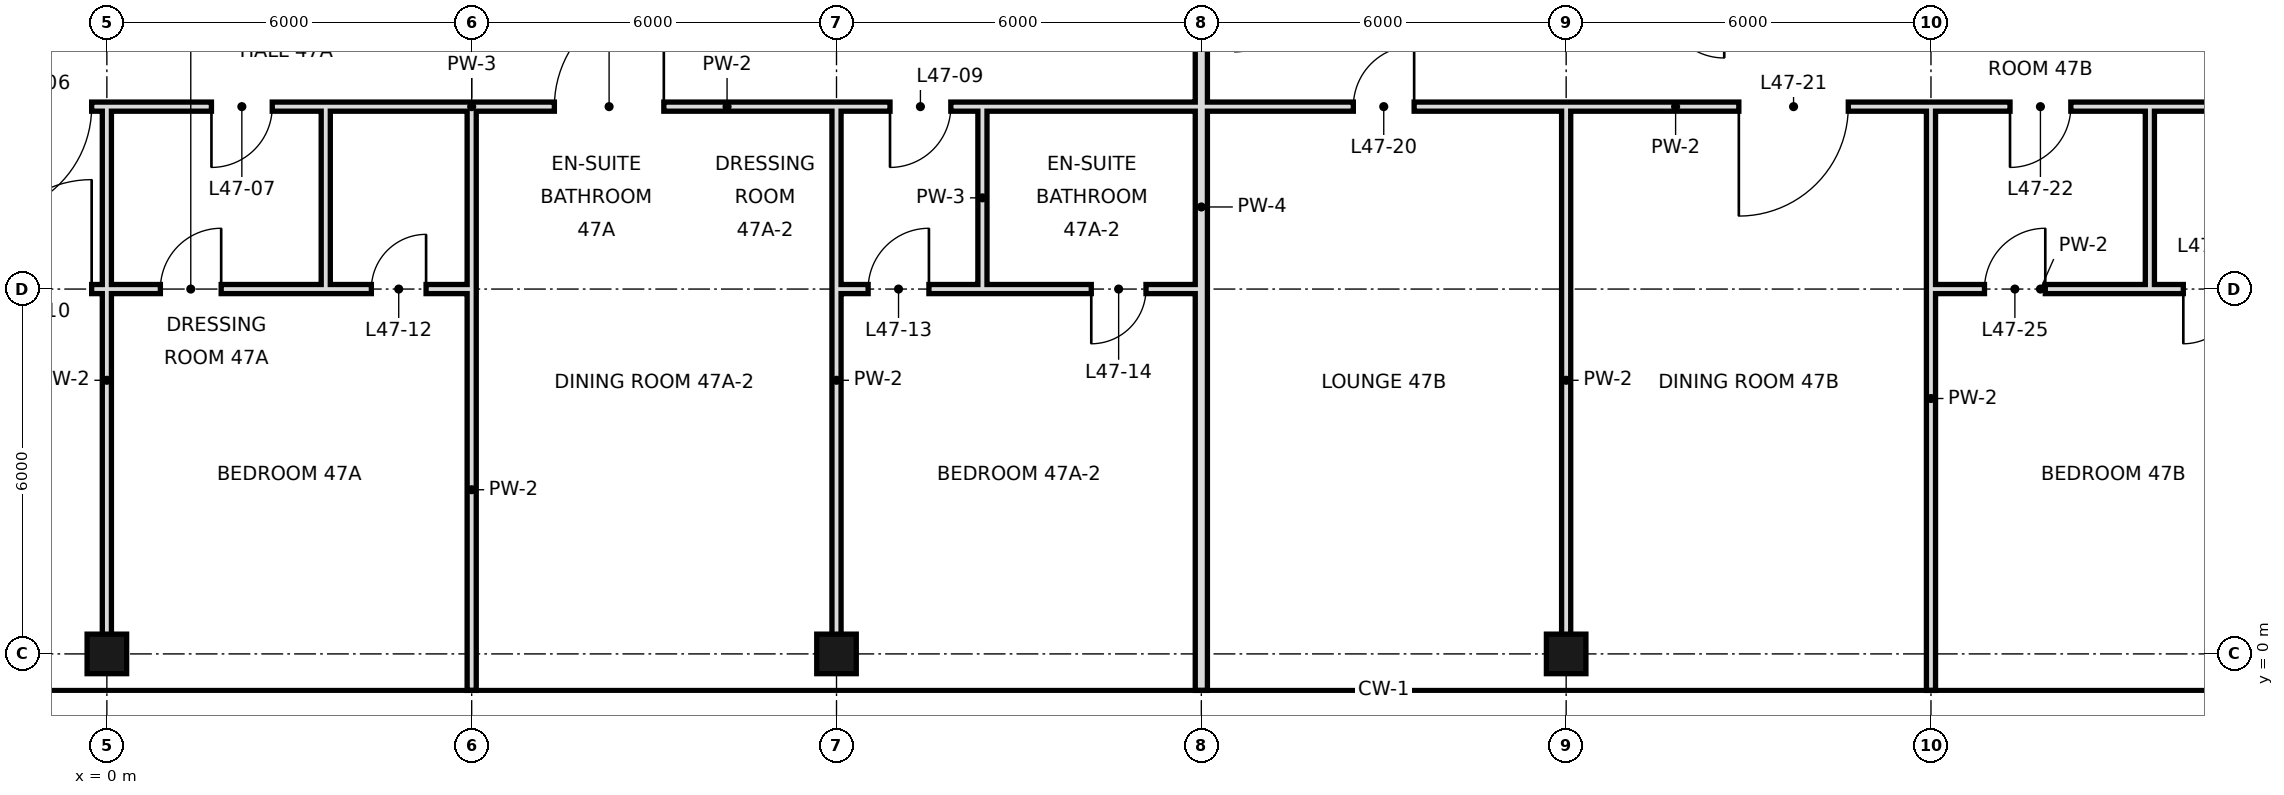
"""IFC4 building model, lengths in metres.
Left out: names, types, materials, properties, quantities, classifications, styles, units other than length and angle.
Written with IfcOpenShell. Run it as: python <this file> out.ifc"""

import sys

from ifc_helpers import new_model, si_unit, direction, frame, frame_2d, origin, origin_2d, place, context, subcontext, project, spatial, rectangle, hollow_rectangle, extrude, element, fill, save


model = new_model("IFC4")
c1 = context("Model", 3, precision=1e-05, world=origin(), true_north=direction((0.0, 1.0)))
c2 = subcontext(c1, "Body", "Model", "MODEL_VIEW")
j1 = project(units=[si_unit("LENGTHUNIT", "METRE"), si_unit("PLANEANGLEUNIT", "RADIAN")], contexts=[c1])
p1 = place(None, origin())
s1 = spatial("IfcSite", under=j1, at=p1, CompositionType="ELEMENT")
p2 = place(p1, origin())
s2 = spatial("IfcBuilding", under=s1, at=p2, CompositionType="ELEMENT")
p3 = place(p2, frame((0.0, 0.0, 202.8)))
s3 = spatial("IfcBuildingStorey", under=s2, at=p3, CompositionType="ELEMENT", Elevation=202.8)
for number, where, z_axis, x_axis in (
    (1, (0.0, 0.0, 0.0), (0.0, 0.0, 1.0), (1.0, 0.0, 0.0)),
    (2, (12.0, 0.0, 0.0), (0.0, 0.0, 1.0), (1.0, 0.0, 0.0)),
    (3, (24.0, 0.0, 0.0), (0.0, 0.0, 1.0), (1.0, 0.0, 0.0)),
):
    element("IfcColumn", number, at=place(p3, frame(where, z_axis=z_axis, x_axis=x_axis)), inside=s3, PredefinedType="COLUMN", context=c2, shape_type="SweptSolid", body=[
        extrude(hollow_rectangle(XDim=0.65, YDim=0.65, WallThickness=0.032, at=origin_2d()), origin(), (0.0, 0.0, 1.0), 3.6),
    ])
for number, where, z_axis, x_axis in (
    (4, (0.0, 0.0, 0.0), (0.0, 0.0, 1.0), (0.0, 1.0, 0.0)),
    (5, (12.0, 0.0, 0.0), (0.0, 0.0, 1.0), (0.0, 1.0, 0.0)),
):
    element("IfcWall", number, at=place(p3, frame(where, z_axis=z_axis, x_axis=x_axis)), inside=s3, PredefinedType="PARTITIONING", context=c2, shape_type="SweptSolid", body=[
        extrude(rectangle(XDim=9.0, YDim=0.15, at=frame_2d((4.5, 0.0))), origin(), (0.0, 0.0, 1.0), 2.72),
    ])
p4 = place(p3, frame((14.4, 6.0, 0.0), z_axis=(0.0, 0.0, 1.0), x_axis=(0.0, 1.0, 0.0)))
e6 = element("IfcWall", 6, at=p4, inside=s3, PredefinedType="PARTITIONING", context=c2, shape_type="SweptSolid", body=[
    extrude(rectangle(XDim=3.0, YDim=0.15, at=frame_2d((1.5, 0.0))), origin(), (0.0, 0.0, 1.0), 3.42),
])
p5 = place(p3, frame((18.0, -0.6, 0.0), z_axis=(0.0, 0.0, 1.0), x_axis=(0.0, 1.0, 0.0)))
e7 = element("IfcWall", 7, at=p5, inside=s3, PredefinedType="SOLIDWALL", context=c2, shape_type="SweptSolid", body=[
    extrude(rectangle(XDim=15.9, YDim=0.2, at=frame_2d((7.95, 0.0))), origin(), (0.0, 0.0, 1.0), 2.72),
])
p6 = place(p3, frame((24.0, 0.0, 0.0), z_axis=(0.0, 0.0, 1.0), x_axis=(0.0, 1.0, 0.0)))
e8 = element("IfcWall", 8, at=p6, inside=s3, PredefinedType="PARTITIONING", context=c2, shape_type="SweptSolid", body=[
    extrude(rectangle(XDim=9.0, YDim=0.15, at=frame_2d((4.5, 0.0))), origin(), (0.0, 0.0, 1.0), 2.72),
])
p7 = place(p3, frame((3.6, 6.0, 0.0), z_axis=(0.0, 0.0, 1.0), x_axis=(0.0, 1.0, 0.0)))
e9 = element("IfcWall", 9, at=p7, inside=s3, PredefinedType="PARTITIONING", context=c2, shape_type="SweptSolid", body=[
    extrude(rectangle(XDim=3.0, YDim=0.15, at=frame_2d((1.5, 0.0))), origin(), (0.0, 0.0, 1.0), 3.42),
])
p8 = place(p3, frame((30.0, -0.6, 0.0), z_axis=(0.0, 0.0, 1.0), x_axis=(0.0, 1.0, 0.0)))
e10 = element("IfcWall", 10, at=p8, inside=s3, PredefinedType="PARTITIONING", context=c2, shape_type="SweptSolid", body=[
    extrude(rectangle(XDim=9.6, YDim=0.15, at=frame_2d((4.8, 0.0))), origin(), (0.0, 0.0, 1.0), 2.72),
])
p9 = place(p3, frame((33.6, 6.0, 0.0), z_axis=(0.0, 0.0, 1.0), x_axis=(0.0, 1.0, 0.0)))
e11 = element("IfcWall", 11, at=p9, inside=s3, PredefinedType="PARTITIONING", context=c2, shape_type="SweptSolid", body=[
    extrude(rectangle(XDim=3.0, YDim=0.15, at=frame_2d((1.5, 0.0))), origin(), (0.0, 0.0, 1.0), 3.42),
])
p10 = place(p3, frame((6.0, -0.6, 0.0), z_axis=(0.0, 0.0, 1.0), x_axis=(0.0, 1.0, 0.0)))
e12 = element("IfcWall", 12, at=p10, inside=s3, PredefinedType="PARTITIONING", context=c2, shape_type="SweptSolid", body=[
    extrude(rectangle(XDim=6.6, YDim=0.15, at=frame_2d((3.3, 0.0))), origin(), (0.0, 0.0, 1.0), 2.72),
])
p11 = place(p3, frame((6.0, 6.0, 0.0), z_axis=(0.0, 0.0, 1.0), x_axis=(0.0, 1.0, 0.0)))
e13 = element("IfcWall", 13, at=p11, inside=s3, PredefinedType="PARTITIONING", context=c2, shape_type="SweptSolid", body=[
    extrude(rectangle(XDim=3.0, YDim=0.15, at=frame_2d((1.5, 0.0))), origin(), (0.0, 0.0, 1.0), 2.72),
])
p12 = place(p3, frame((-12.0, 6.0, 0.0), z_axis=(0.0, 0.0, 1.0), x_axis=(1.0, 0.0, 0.0)))
e14 = element("IfcWall", 14, at=p12, inside=s3, PredefinedType="PARTITIONING", context=c2, shape_type="SweptSolid", body=[
    extrude(rectangle(XDim=15.6, YDim=0.15, at=frame_2d((7.8, 0.0))), origin(), (0.0, 0.0, 1.0), 2.72),
])
p13 = place(p12, frame((9.95, 0.0, 0.0)))
e15 = element("IfcOpeningElement", 15, at=p13, cuts=e14, PredefinedType="OPENING", context=c2, shape_type="SweptSolid", body=[
    extrude(rectangle(XDim=1.8, YDim=2.4, at=frame_2d((0.9, 1.2))), frame((0.0, 0.085, 0.0), z_axis=(0.0, -1.0, 0.0), x_axis=(1.0, 0.0, 0.0)), (0.0, 0.0, 1.0), 0.17),
])
p14 = place(p12, frame((12.88, 0.0, 0.0)))
e16 = element("IfcOpeningElement", 16, at=p14, cuts=e14, PredefinedType="OPENING", context=c2, shape_type="SweptSolid", body=[
    extrude(rectangle(XDim=1.0, YDim=2.4, at=frame_2d((0.5, 1.2))), frame((0.0, 0.085, 0.0), z_axis=(0.0, -1.0, 0.0), x_axis=(1.0, 0.0, 0.0)), (0.0, 0.0, 1.0), 0.17),
])
p15 = place(p3, frame((12.0, 6.0, 0.0), z_axis=(0.0, 0.0, 1.0), x_axis=(1.0, 0.0, 0.0)))
e17 = element("IfcWall", 17, at=p15, inside=s3, PredefinedType="PARTITIONING", context=c2, shape_type="SweptSolid", body=[
    extrude(rectangle(XDim=2.4, YDim=0.15, at=frame_2d((1.2, 0.0))), origin(), (0.0, 0.0, 1.0), 2.97),
])
p16 = place(p15, frame((0.52, 0.0, 0.0)))
e18 = element("IfcOpeningElement", 18, at=p16, cuts=e17, PredefinedType="OPENING", context=c2, shape_type="SweptSolid", body=[
    extrude(rectangle(XDim=1.0, YDim=2.4, at=frame_2d((0.5, 1.2))), frame((0.0, 0.085, 0.0), z_axis=(0.0, -1.0, 0.0), x_axis=(1.0, 0.0, 0.0)), (0.0, 0.0, 1.0), 0.17),
])
p17 = place(p3, frame((30.0, 6.0, 0.0), z_axis=(0.0, 0.0, 1.0), x_axis=(1.0, 0.0, 0.0)))
e19 = element("IfcWall", 19, at=p17, inside=s3, PredefinedType="PARTITIONING", context=c2, shape_type="SweptSolid", body=[
    extrude(rectangle(XDim=3.6, YDim=0.15, at=frame_2d((1.8, 0.0))), origin(), (0.0, 0.0, 1.0), 2.97),
])
p18 = place(p17, frame((0.88, 0.0, 0.0)))
e20 = element("IfcOpeningElement", 20, at=p18, cuts=e19, PredefinedType="OPENING", context=c2, shape_type="SweptSolid", body=[
    extrude(rectangle(XDim=1.0, YDim=2.4, at=frame_2d((0.5, 1.2))), frame((0.0, 0.085, 0.0), z_axis=(0.0, -1.0, 0.0), x_axis=(1.0, 0.0, 0.0)), (0.0, 0.0, 1.0), 0.17),
])
p19 = place(p3, frame((3.6, 6.0, 0.0), z_axis=(0.0, 0.0, 1.0), x_axis=(1.0, 0.0, 0.0)))
e21 = element("IfcWall", 21, at=p19, inside=s3, PredefinedType="PARTITIONING", context=c2, shape_type="SweptSolid", body=[
    extrude(rectangle(XDim=2.4, YDim=0.15, at=frame_2d((1.2, 0.0))), origin(), (0.0, 0.0, 1.0), 2.97),
])
p20 = place(p19, frame((0.75, 0.0, 0.0)))
e22 = element("IfcOpeningElement", 22, at=p20, cuts=e21, PredefinedType="OPENING", context=c2, shape_type="SweptSolid", body=[
    extrude(rectangle(XDim=0.9, YDim=2.4, at=frame_2d((0.45, 1.2))), frame((0.0, 0.085, 0.0), z_axis=(0.0, -1.0, 0.0), x_axis=(1.0, 0.0, 0.0)), (0.0, 0.0, 1.0), 0.17),
])
p21 = place(p3, frame((14.4, 6.0, 0.0), z_axis=(0.0, 0.0, 1.0), x_axis=(1.0, 0.0, 0.0)))
e23 = element("IfcWall", 23, at=p21, inside=s3, PredefinedType="PARTITIONING", context=c2, shape_type="SweptSolid", body=[
    extrude(rectangle(XDim=3.6, YDim=0.15, at=frame_2d((1.8, 0.0))), origin(), (0.0, 0.0, 1.0), 2.97),
])
p22 = place(p21, frame((1.79, 0.0, 0.0)))
e24 = element("IfcOpeningElement", 24, at=p22, cuts=e23, PredefinedType="OPENING", context=c2, shape_type="SweptSolid", body=[
    extrude(rectangle(XDim=0.9, YDim=2.4, at=frame_2d((0.45, 1.2))), frame((0.0, 0.085, 0.0), z_axis=(0.0, -1.0, 0.0), x_axis=(1.0, 0.0, 0.0)), (0.0, 0.0, 1.0), 0.17),
])
p23 = place(p3, frame((33.6, 6.0, 0.0), z_axis=(0.0, 0.0, 1.0), x_axis=(1.0, 0.0, 0.0)))
e25 = element("IfcWall", 25, at=p23, inside=s3, PredefinedType="PARTITIONING", context=c2, shape_type="SweptSolid", body=[
    extrude(rectangle(XDim=6.0, YDim=0.15, at=frame_2d((3.0, 0.0))), origin(), (0.0, 0.0, 1.0), 2.97),
])
p24 = place(p23, frame((0.55, 0.0, 0.0)))
e26 = element("IfcOpeningElement", 26, at=p24, cuts=e25, PredefinedType="OPENING", context=c2, shape_type="SweptSolid", body=[
    extrude(rectangle(XDim=0.9, YDim=2.4, at=frame_2d((0.45, 1.2))), frame((0.0, 0.085, 0.0), z_axis=(0.0, -1.0, 0.0), x_axis=(1.0, 0.0, 0.0)), (0.0, 0.0, 1.0), 0.17),
])
p25 = place(p23, frame((3.31, 0.0, 0.0)))
e27 = element("IfcOpeningElement", 27, at=p25, cuts=e25, PredefinedType="OPENING", context=c2, shape_type="SweptSolid", body=[
    extrude(rectangle(XDim=0.9, YDim=2.4, at=frame_2d((0.45, 1.2))), frame((0.0, 0.085, 0.0), z_axis=(0.0, -1.0, 0.0), x_axis=(1.0, 0.0, 0.0)), (0.0, 0.0, 1.0), 0.17),
])
p26 = place(p3, frame((-12.6, 9.0, 0.0), z_axis=(0.0, 0.0, 1.0), x_axis=(1.0, 0.0, 0.0)))
e28 = element("IfcWall", 28, at=p26, inside=s3, PredefinedType="PARTITIONING", context=c2, shape_type="SweptSolid", body=[
    extrude(rectangle(XDim=16.2, YDim=0.15, at=frame_2d((8.1, 0.0))), origin(), (0.0, 0.0, 1.0), 3.42),
])
p27 = place(p26, frame((10.55, 0.0, 0.0)))
e29 = element("IfcOpeningElement", 29, at=p27, cuts=e28, PredefinedType="OPENING", context=c2, shape_type="SweptSolid", body=[
    extrude(rectangle(XDim=1.8, YDim=2.4, at=frame_2d((0.9, 1.2))), frame((0.0, 0.085, 0.0), z_axis=(0.0, -1.0, 0.0), x_axis=(1.0, 0.0, 0.0)), (0.0, 0.0, 1.0), 0.17),
])
p28 = place(p26, frame((14.32, 0.0, 0.0)))
e30 = element("IfcOpeningElement", 30, at=p28, cuts=e28, PredefinedType="OPENING", context=c2, shape_type="SweptSolid", body=[
    extrude(rectangle(XDim=1.0, YDim=2.4, at=frame_2d((0.5, 1.2))), frame((0.0, 0.085, 0.0), z_axis=(0.0, -1.0, 0.0), x_axis=(1.0, 0.0, 0.0)), (0.0, 0.0, 1.0), 0.17),
])
p29 = place(p3, frame((6.0, 9.0, 0.0), z_axis=(0.0, 0.0, 1.0), x_axis=(1.0, 0.0, 0.0)))
e31 = element("IfcWall", 31, at=p29, inside=s3, PredefinedType="PARTITIONING", context=c2, shape_type="SweptSolid", body=[
    extrude(rectangle(XDim=8.4, YDim=0.15, at=frame_2d((4.2, 0.0))), origin(), (0.0, 0.0, 1.0), 3.42),
])
p30 = place(p29, frame((1.36, 0.0, 0.0)))
e32 = element("IfcOpeningElement", 32, at=p30, cuts=e31, PredefinedType="OPENING", context=c2, shape_type="SweptSolid", body=[
    extrude(rectangle(XDim=1.8, YDim=2.4, at=frame_2d((0.9, 1.2))), frame((0.0, 0.085, 0.0), z_axis=(0.0, -1.0, 0.0), x_axis=(1.0, 0.0, 0.0)), (0.0, 0.0, 1.0), 0.17),
])
p31 = place(p29, frame((6.88, 0.0, 0.0)))
e33 = element("IfcOpeningElement", 33, at=p31, cuts=e31, PredefinedType="OPENING", context=c2, shape_type="SweptSolid", body=[
    extrude(rectangle(XDim=1.0, YDim=2.4, at=frame_2d((0.5, 1.2))), frame((0.0, 0.085, 0.0), z_axis=(0.0, -1.0, 0.0), x_axis=(1.0, 0.0, 0.0)), (0.0, 0.0, 1.0), 0.17),
])
p32 = place(p3, frame((18.0, 9.0, 0.0), z_axis=(0.0, 0.0, 1.0), x_axis=(1.0, 0.0, 0.0)))
e34 = element("IfcWall", 34, at=p32, inside=s3, PredefinedType="PARTITIONING", context=c2, shape_type="SweptSolid", body=[
    extrude(rectangle(XDim=15.6, YDim=0.15, at=frame_2d((7.8, 0.0))), origin(), (0.0, 0.0, 1.0), 3.42),
])
p33 = place(p32, frame((2.5, 0.0, 0.0)))
e35 = element("IfcOpeningElement", 35, at=p33, cuts=e34, PredefinedType="OPENING", context=c2, shape_type="SweptSolid", body=[
    extrude(rectangle(XDim=1.0, YDim=2.4, at=frame_2d((0.5, 1.2))), frame((0.0, 0.085, 0.0), z_axis=(0.0, -1.0, 0.0), x_axis=(1.0, 0.0, 0.0)), (0.0, 0.0, 1.0), 0.17),
])
p34 = place(p32, frame((8.84, 0.0, 0.0)))
e36 = element("IfcOpeningElement", 36, at=p34, cuts=e34, PredefinedType="OPENING", context=c2, shape_type="SweptSolid", body=[
    extrude(rectangle(XDim=1.8, YDim=2.4, at=frame_2d((0.9, 1.2))), frame((0.0, 0.085, 0.0), z_axis=(0.0, -1.0, 0.0), x_axis=(1.0, 0.0, 0.0)), (0.0, 0.0, 1.0), 0.17),
])
p35 = place(p32, frame((13.3, 0.0, 0.0)))
e37 = element("IfcOpeningElement", 37, at=p35, cuts=e34, PredefinedType="OPENING", context=c2, shape_type="SweptSolid", body=[
    extrude(rectangle(XDim=1.0, YDim=2.4, at=frame_2d((0.5, 1.2))), frame((0.0, 0.085, 0.0), z_axis=(0.0, -1.0, 0.0), x_axis=(1.0, 0.0, 0.0)), (0.0, 0.0, 1.0), 0.17),
])
p36 = place(p3, frame((3.6, 9.0, 0.0), z_axis=(0.0, 0.0, 1.0), x_axis=(1.0, 0.0, 0.0)))
e38 = element("IfcWall", 38, at=p36, inside=s3, PredefinedType="PARTITIONING", context=c2, shape_type="SweptSolid", body=[
    extrude(rectangle(XDim=2.4, YDim=0.15, at=frame_2d((1.2, 0.0))), origin(), (0.0, 0.0, 1.0), 3.42),
])
p37 = place(p3, frame((14.4, 9.0, 0.0), z_axis=(0.0, 0.0, 1.0), x_axis=(1.0, 0.0, 0.0)))
e39 = element("IfcWall", 39, at=p37, inside=s3, PredefinedType="PARTITIONING", context=c2, shape_type="SweptSolid", body=[
    extrude(rectangle(XDim=3.6, YDim=0.15, at=frame_2d((1.8, 0.0))), origin(), (0.0, 0.0, 1.0), 3.42),
])
p38 = place(p3, frame((33.6, 9.0, 0.0), z_axis=(0.0, 0.0, 1.0), x_axis=(1.0, 0.0, 0.0)))
e40 = element("IfcWall", 40, at=p38, inside=s3, PredefinedType="PARTITIONING", context=c2, shape_type="SweptSolid", body=[
    extrude(rectangle(XDim=6.0, YDim=0.15, at=frame_2d((3.0, 0.0))), origin(), (0.0, 0.0, 1.0), 3.42),
])
p39 = place(p27, frame((1.8, 0.0, 0.0), z_axis=(0.0, 0.0, 1.0), x_axis=(-1.0, 0.0, 0.0)))
e41 = element("IfcDoor", 41, at=p39, inside=s3, OperationType="SINGLE_SWING_RIGHT", PredefinedType="DOOR", context=c2, shape_type="SweptSolid", body=[
    extrude(rectangle(XDim=1.8, YDim=2.4, at=frame_2d((0.9, 1.2))), frame((0.0, 0.025, 0.0), z_axis=(0.0, -1.0, 0.0), x_axis=(1.0, 0.0, 0.0)), (0.0, 0.0, 1.0), 0.05),
])
fill(e29, e41)
p40 = place(p28, frame((1.0, 0.0, 0.0), z_axis=(0.0, 0.0, 1.0), x_axis=(-1.0, 0.0, 0.0)))
e42 = element("IfcDoor", 42, at=p40, inside=s3, OperationType="SINGLE_SWING_RIGHT", PredefinedType="DOOR", context=c2, shape_type="SweptSolid", body=[
    extrude(rectangle(XDim=1.0, YDim=2.4, at=frame_2d((0.5, 1.2))), frame((0.0, 0.025, 0.0), z_axis=(0.0, -1.0, 0.0), x_axis=(1.0, 0.0, 0.0)), (0.0, 0.0, 1.0), 0.05),
])
fill(e30, e42)
p41 = place(p30, frame((1.8, 0.0, 0.0), z_axis=(0.0, 0.0, 1.0), x_axis=(-1.0, 0.0, 0.0)))
e43 = element("IfcDoor", 43, at=p41, inside=s3, OperationType="SINGLE_SWING_LEFT", PredefinedType="DOOR", context=c2, shape_type="SweptSolid", body=[
    extrude(rectangle(XDim=1.8, YDim=2.4, at=frame_2d((0.9, 1.2))), frame((0.0, 0.025, 0.0), z_axis=(0.0, -1.0, 0.0), x_axis=(1.0, 0.0, 0.0)), (0.0, 0.0, 1.0), 0.05),
])
fill(e32, e43)
p42 = place(p31, frame((1.0, 0.0, 0.0), z_axis=(0.0, 0.0, 1.0), x_axis=(-1.0, 0.0, 0.0)))
e44 = element("IfcDoor", 44, at=p42, inside=s3, OperationType="SINGLE_SWING_RIGHT", PredefinedType="DOOR", context=c2, shape_type="SweptSolid", body=[
    extrude(rectangle(XDim=1.0, YDim=2.4, at=frame_2d((0.5, 1.2))), frame((0.0, 0.025, 0.0), z_axis=(0.0, -1.0, 0.0), x_axis=(1.0, 0.0, 0.0)), (0.0, 0.0, 1.0), 0.05),
])
fill(e33, e44)
p43 = place(p13, frame((1.8, 0.0, 0.0), z_axis=(0.0, 0.0, 1.0), x_axis=(-1.0, 0.0, 0.0)))
e45 = element("IfcDoor", 45, at=p43, inside=s3, OperationType="SINGLE_SWING_LEFT", PredefinedType="DOOR", context=c2, shape_type="SweptSolid", body=[
    extrude(rectangle(XDim=1.8, YDim=2.4, at=frame_2d((0.9, 1.2))), frame((0.0, 0.025, 0.0), z_axis=(0.0, -1.0, 0.0), x_axis=(1.0, 0.0, 0.0)), (0.0, 0.0, 1.0), 0.05),
])
fill(e15, e45)
p44 = place(p14, frame((1.0, 0.0, 0.0), z_axis=(0.0, 0.0, 1.0), x_axis=(-1.0, 0.0, 0.0)))
e46 = element("IfcDoor", 46, at=p44, inside=s3, OperationType="SINGLE_SWING_LEFT", PredefinedType="DOOR", context=c2, shape_type="SweptSolid", body=[
    extrude(rectangle(XDim=1.0, YDim=2.4, at=frame_2d((0.5, 1.2))), frame((0.0, 0.025, 0.0), z_axis=(0.0, -1.0, 0.0), x_axis=(1.0, 0.0, 0.0)), (0.0, 0.0, 1.0), 0.05),
])
fill(e16, e46)
p45 = place(p20, frame((0.9, 0.0, 0.0), z_axis=(0.0, 0.0, 1.0), x_axis=(-1.0, 0.0, 0.0)))
e47 = element("IfcDoor", 47, at=p45, inside=s3, OperationType="SINGLE_SWING_LEFT", PredefinedType="DOOR", context=c2, shape_type="SweptSolid", body=[
    extrude(rectangle(XDim=0.9, YDim=2.4, at=frame_2d((0.45, 1.2))), frame((0.0, 0.025, 0.0), z_axis=(0.0, -1.0, 0.0), x_axis=(1.0, 0.0, 0.0)), (0.0, 0.0, 1.0), 0.05),
])
fill(e22, e47)
p46 = place(p16, frame((1.0, 0.0, 0.0), z_axis=(0.0, 0.0, 1.0), x_axis=(-1.0, 0.0, 0.0)))
e48 = element("IfcDoor", 48, at=p46, inside=s3, OperationType="SINGLE_SWING_LEFT", PredefinedType="DOOR", context=c2, shape_type="SweptSolid", body=[
    extrude(rectangle(XDim=1.0, YDim=2.4, at=frame_2d((0.5, 1.2))), frame((0.0, 0.025, 0.0), z_axis=(0.0, -1.0, 0.0), x_axis=(1.0, 0.0, 0.0)), (0.0, 0.0, 1.0), 0.05),
])
fill(e18, e48)
p47 = place(p22, frame((0.9, 0.0, 0.0), z_axis=(0.0, 0.0, 1.0), x_axis=(-1.0, 0.0, 0.0)))
e49 = element("IfcDoor", 49, at=p47, inside=s3, OperationType="SINGLE_SWING_RIGHT", PredefinedType="DOOR", context=c2, shape_type="SweptSolid", body=[
    extrude(rectangle(XDim=0.9, YDim=2.4, at=frame_2d((0.45, 1.2))), frame((0.0, 0.025, 0.0), z_axis=(0.0, -1.0, 0.0), x_axis=(1.0, 0.0, 0.0)), (0.0, 0.0, 1.0), 0.05),
])
fill(e24, e49)
p48 = place(p33, frame((1.0, 0.0, 0.0), z_axis=(0.0, 0.0, 1.0), x_axis=(-1.0, 0.0, 0.0)))
e50 = element("IfcDoor", 50, at=p48, inside=s3, OperationType="SINGLE_SWING_LEFT", PredefinedType="DOOR", context=c2, shape_type="SweptSolid", body=[
    extrude(rectangle(XDim=1.0, YDim=2.4, at=frame_2d((0.5, 1.2))), frame((0.0, 0.025, 0.0), z_axis=(0.0, -1.0, 0.0), x_axis=(1.0, 0.0, 0.0)), (0.0, 0.0, 1.0), 0.05),
])
fill(e35, e50)
p49 = place(p34, frame((1.8, 0.0, 0.0), z_axis=(0.0, 0.0, 1.0), x_axis=(-1.0, 0.0, 0.0)))
e51 = element("IfcDoor", 51, at=p49, inside=s3, OperationType="SINGLE_SWING_RIGHT", PredefinedType="DOOR", context=c2, shape_type="SweptSolid", body=[
    extrude(rectangle(XDim=1.8, YDim=2.4, at=frame_2d((0.9, 1.2))), frame((0.0, 0.025, 0.0), z_axis=(0.0, -1.0, 0.0), x_axis=(1.0, 0.0, 0.0)), (0.0, 0.0, 1.0), 0.05),
])
fill(e36, e51)
p50 = place(p35, frame((1.0, 0.0, 0.0), z_axis=(0.0, 0.0, 1.0), x_axis=(-1.0, 0.0, 0.0)))
e52 = element("IfcDoor", 52, at=p50, inside=s3, OperationType="SINGLE_SWING_RIGHT", PredefinedType="DOOR", context=c2, shape_type="SweptSolid", body=[
    extrude(rectangle(XDim=1.0, YDim=2.4, at=frame_2d((0.5, 1.2))), frame((0.0, 0.025, 0.0), z_axis=(0.0, -1.0, 0.0), x_axis=(1.0, 0.0, 0.0)), (0.0, 0.0, 1.0), 0.05),
])
fill(e37, e52)
p51 = place(p18, frame((1.0, 0.0, 0.0), z_axis=(0.0, 0.0, 1.0), x_axis=(-1.0, 0.0, 0.0)))
e53 = element("IfcDoor", 53, at=p51, inside=s3, OperationType="SINGLE_SWING_LEFT", PredefinedType="DOOR", context=c2, shape_type="SweptSolid", body=[
    extrude(rectangle(XDim=1.0, YDim=2.4, at=frame_2d((0.5, 1.2))), frame((0.0, 0.025, 0.0), z_axis=(0.0, -1.0, 0.0), x_axis=(1.0, 0.0, 0.0)), (0.0, 0.0, 1.0), 0.05),
])
fill(e20, e53)
p52 = place(p24, frame((0.9, 0.0, 0.0), z_axis=(0.0, 0.0, 1.0), x_axis=(-1.0, 0.0, 0.0)))
e54 = element("IfcDoor", 54, at=p52, inside=s3, OperationType="SINGLE_SWING_RIGHT", PredefinedType="DOOR", context=c2, shape_type="SweptSolid", body=[
    extrude(rectangle(XDim=0.9, YDim=2.4, at=frame_2d((0.45, 1.2))), frame((0.0, 0.025, 0.0), z_axis=(0.0, -1.0, 0.0), x_axis=(1.0, 0.0, 0.0)), (0.0, 0.0, 1.0), 0.05),
])
fill(e26, e54)
save(model, sys.argv[1])
